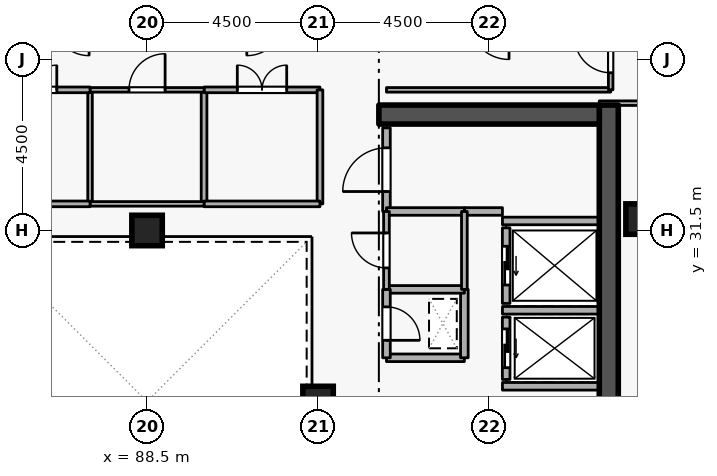
"""IFC4 building model, lengths in metres.
Left out: names, types, materials, properties, quantities, classifications, styles, units other than length and angle.
Written with IfcOpenShell. Run it as: python <this file> out.ifc"""

import sys

from ifc_helpers import new_model, si_unit, direction, frame, frame_2d, origin, origin_2d, place, context, subcontext, project, spatial, rectangle, extrude, element, fill, save


model = new_model("IFC4")
c1 = context("Model", 3, precision=1e-05, world=origin(), true_north=direction((0.0, 1.0)))
c2 = subcontext(c1, "Body", "Model", "MODEL_VIEW")
j1 = project(units=[si_unit("LENGTHUNIT", "METRE"), si_unit("PLANEANGLEUNIT", "RADIAN")], contexts=[c1])
p1 = place(None, origin())
s1 = spatial("IfcSite", under=j1, at=p1, CompositionType="ELEMENT")
p2 = place(p1, origin())
s2 = spatial("IfcBuilding", under=s1, at=p2, CompositionType="ELEMENT")
p3 = place(p2, frame((0.0, 0.0, 276.3)))
s3 = spatial("IfcBuildingStorey", under=s2, at=p3, CompositionType="ELEMENT", Elevation=276.3)
p4 = place(p3, frame((100.65, 19.2, 0.0), z_axis=(0.0, 0.0, 1.0), x_axis=(0.0, 1.0, 0.0)))
e1 = element("IfcWall", 1, at=p4, inside=s3, PredefinedType="SHEAR", context=c2, shape_type="SweptSolid", body=[
    extrude(rectangle(XDim=15.6, YDim=0.5, at=frame_2d((7.8, 0.0))), origin(), (0.0, 0.0, 1.0), 3.6),
])
p5 = place(p3, frame((94.6, 34.55, 0.0), z_axis=(0.0, 0.0, 1.0), x_axis=(1.0, 0.0, 0.0)))
e2 = element("IfcWall", 2, at=p5, inside=s3, PredefinedType="SHEAR", context=c2, shape_type="SweptSolid", body=[
    extrude(rectangle(XDim=5.8, YDim=0.5, at=frame_2d((2.9, 0.0))), origin(), (0.0, 0.0, 1.0), 3.6),
])
for number, where, z_axis, x_axis in (
    (3, (101.5, 31.8, 0.0), (0.0, 0.0, 1.0), (1.0, 0.0, 0.0)),
    (4, (93.0, 27.0, 0.0), (0.0, 0.0, 1.0), (1.0, 0.0, 0.0)),
    (5, (88.5, 31.5, 0.0), (0.0, 0.0, 1.0), (1.0, 0.0, 0.0)),
):
    element("IfcColumn", number, at=place(p3, frame(where, z_axis=z_axis, x_axis=x_axis)), inside=s3, PredefinedType="COLUMN", context=c2, shape_type="SweptSolid", body=[
        extrude(rectangle(XDim=0.8, YDim=0.8, at=origin_2d()), origin(), (0.0, 0.0, 1.0), 3.6),
    ])
p6 = place(p3, frame((97.95, 29.22, 0.0), z_axis=(0.0, 0.0, 1.0), x_axis=(0.0, -1.0, 0.0)))
e6 = element("IfcWall", 6, at=p6, inside=s3, PredefinedType="STANDARD", context=c2, shape_type="SweptSolid", body=[
    extrude(rectangle(XDim=1.64, YDim=0.2, at=frame_2d((0.82, 0.0))), origin(), (0.0, 0.0, 1.0), 3.26),
])
p7 = place(p6, frame((0.31, 0.0, 0.0)))
e7 = element("IfcOpeningElement", 7, at=p7, cuts=e6, PredefinedType="OPENING", context=c2, shape_type="SweptSolid", body=[
    extrude(rectangle(XDim=1.02, YDim=2.06, at=frame_2d((0.51, 1.03))), frame((0.0, 0.11, 0.0), z_axis=(0.0, -1.0, 0.0), x_axis=(1.0, 0.0, 0.0)), (0.0, 0.0, 1.0), 0.22),
])
p8 = place(p3, frame((97.95, 31.57, 0.0), z_axis=(0.0, 0.0, 1.0), x_axis=(0.0, -1.0, 0.0)))
e8 = element("IfcWall", 8, at=p8, inside=s3, PredefinedType="STANDARD", context=c2, shape_type="SweptSolid", body=[
    extrude(rectangle(XDim=1.99, YDim=0.2, at=frame_2d((0.995, 0.0))), origin(), (0.0, 0.0, 1.0), 3.26),
])
p9 = place(p8, frame((0.485, 0.0, 0.0)))
e9 = element("IfcOpeningElement", 9, at=p9, cuts=e8, PredefinedType="OPENING", context=c2, shape_type="SweptSolid", body=[
    extrude(rectangle(XDim=1.02, YDim=2.06, at=frame_2d((0.51, 1.03))), frame((0.0, 0.11, 0.0), z_axis=(0.0, -1.0, 0.0), x_axis=(1.0, 0.0, 0.0)), (0.0, 0.0, 1.0), 0.22),
])
for number, where, z_axis, x_axis in (
    (10, (97.852, 29.4, 0.0), (0.0, 0.0, 1.0), (1.0, 0.0, 0.0)),
    (11, (97.852, 27.4, 0.0), (0.0, 0.0, 1.0), (1.0, 0.0, 0.0)),
    (12, (97.852, 31.75, 0.0), (0.0, 0.0, 1.0), (1.0, 0.0, 0.0)),
):
    element("IfcWall", number, at=place(p3, frame(where, z_axis=z_axis, x_axis=x_axis)), inside=s3, PredefinedType="STANDARD", context=c2, shape_type="SweptSolid", body=[
        extrude(rectangle(XDim=2.536, YDim=0.2, at=frame_2d((1.268, 0.0))), origin(), (0.0, 0.0, 1.0), 3.26),
    ])
p10 = place(p3, frame((94.8, 28.15, 0.0), z_axis=(0.0, 0.0, 1.0), x_axis=(1.0, 0.0, 0.0)))
e13 = element("IfcWall", 13, at=p10, inside=s3, PredefinedType="STANDARD", context=c2, shape_type="SweptSolid", body=[
    extrude(rectangle(XDim=2.05, YDim=0.2, at=frame_2d((1.025, 0.0))), origin(), (0.0, 0.0, 1.0), 3.26),
])
p11 = place(p3, frame((96.85, 28.15, 0.0), z_axis=(0.0, 0.0, 1.0), x_axis=(0.0, 1.0, 0.0)))
e14 = element("IfcWall", 14, at=p11, inside=s3, PredefinedType="STANDARD", context=c2, shape_type="SweptSolid", body=[
    extrude(rectangle(XDim=1.8, YDim=0.2, at=frame_2d((0.9, 0.0))), origin(), (0.0, 0.0, 1.0), 3.26),
])
p12 = place(p3, frame((96.85, 29.95, 0.0), z_axis=(0.0, 0.0, 1.0), x_axis=(-1.0, 0.0, 0.0)))
e15 = element("IfcWall", 15, at=p12, inside=s3, PredefinedType="STANDARD", context=c2, shape_type="SweptSolid", body=[
    extrude(rectangle(XDim=2.05, YDim=0.2, at=frame_2d((1.025, 0.0))), origin(), (0.0, 0.0, 1.0), 3.26),
])
p13 = place(p3, frame((94.8, 29.95, 0.0), z_axis=(0.0, 0.0, 1.0), x_axis=(0.0, -1.0, 0.0)))
e16 = element("IfcWall", 16, at=p13, inside=s3, PredefinedType="STANDARD", context=c2, shape_type="SweptSolid", body=[
    extrude(rectangle(XDim=1.8, YDim=0.2, at=frame_2d((0.9, 0.0))), origin(), (0.0, 0.0, 1.0), 3.26),
])
p14 = place(p13, frame((0.46, 0.0, 0.0)))
e17 = element("IfcOpeningElement", 17, at=p14, cuts=e16, PredefinedType="OPENING", context=c2, shape_type="SweptSolid", body=[
    extrude(rectangle(XDim=0.88, YDim=2.04, at=frame_2d((0.44, 1.02))), frame((0.0, 0.11, 0.0), z_axis=(0.0, -1.0, 0.0), x_axis=(1.0, 0.0, 0.0)), (0.0, 0.0, 1.0), 0.22),
])
p15 = place(p3, frame((94.8, 32.0, 0.0), z_axis=(0.0, 0.0, 1.0), x_axis=(0.0, 1.0, 0.0)))
e18 = element("IfcWall", 18, at=p15, inside=s3, PredefinedType="STANDARD", context=c2, shape_type="SweptSolid", body=[
    extrude(rectangle(XDim=2.2, YDim=0.2, at=frame_2d((1.1, 0.0))), origin(), (0.0, 0.0, 1.0), 3.26),
])
p16 = place(p15, frame((0.525, 0.0, 0.0)))
e19 = element("IfcOpeningElement", 19, at=p16, cuts=e18, PredefinedType="OPENING", context=c2, shape_type="SweptSolid", body=[
    extrude(rectangle(XDim=1.15, YDim=2.1, at=frame_2d((0.575, 1.05))), frame((0.0, 0.11, 0.0), z_axis=(0.0, -1.0, 0.0), x_axis=(1.0, 0.0, 0.0)), (0.0, 0.0, 1.0), 0.22),
])
p17 = place(p3, frame((97.852, 32.0, 0.0), z_axis=(0.0, 0.0, 1.0), x_axis=(-1.0, 0.0, 0.0)))
e20 = element("IfcWall", 20, at=p17, inside=s3, PredefinedType="STANDARD", context=c2, shape_type="SweptSolid", body=[
    extrude(rectangle(XDim=1.002, YDim=0.2, at=frame_2d((0.501, 0.0))), origin(), (0.0, 0.0, 1.0), 3.26),
])
p18 = place(p3, frame((96.85, 32.0, 0.0), z_axis=(0.0, 0.0, 1.0), x_axis=(-1.0, 0.0, 0.0)))
e21 = element("IfcWall", 21, at=p18, inside=s3, PredefinedType="STANDARD", context=c2, shape_type="SweptSolid", body=[
    extrude(rectangle(XDim=2.05, YDim=0.2, at=frame_2d((1.025, 0.0))), origin(), (0.0, 0.0, 1.0), 3.26),
])
p19 = place(p3, frame((94.8, 29.95, 0.0), z_axis=(0.0, 0.0, 1.0), x_axis=(0.0, 1.0, 0.0)))
e22 = element("IfcWall", 22, at=p19, inside=s3, PredefinedType="PARTITIONING", context=c2, shape_type="SweptSolid", body=[
    extrude(rectangle(XDim=2.05, YDim=0.15, at=frame_2d((1.025, 0.0))), origin(), (0.0, 0.0, 1.0), 3.26),
])
p20 = place(p19, frame((0.565, 0.0, 0.0)))
e23 = element("IfcOpeningElement", 23, at=p20, cuts=e22, PredefinedType="OPENING", context=c2, shape_type="SweptSolid", body=[
    extrude(rectangle(XDim=0.92, YDim=2.08, at=frame_2d((0.46, 1.04))), frame((0.0, 0.085, 0.0), z_axis=(0.0, -1.0, 0.0), x_axis=(1.0, 0.0, 0.0)), (0.0, 0.0, 1.0), 0.17),
])
p21 = place(p3, frame((96.85, 32.0, 0.0), z_axis=(0.0, 0.0, 1.0), x_axis=(0.0, -1.0, 0.0)))
e24 = element("IfcWall", 24, at=p21, inside=s3, PredefinedType="PARTITIONING", context=c2, shape_type="SweptSolid", body=[
    extrude(rectangle(XDim=2.05, YDim=0.15, at=frame_2d((1.025, 0.0))), origin(), (0.0, 0.0, 1.0), 3.26),
])
p22 = place(p3, frame((94.8, 35.2, 0.0), z_axis=(0.0, 0.0, 1.0), x_axis=(1.0, 0.0, 0.0)))
e25 = element("IfcWall", 25, at=p22, inside=s3, PredefinedType="PARTITIONING", context=c2, shape_type="SweptSolid", body=[
    extrude(rectangle(XDim=5.9, YDim=0.12, at=frame_2d((2.95, 0.0))), origin(), (0.0, 0.0, 1.0), 3.26),
])
p23 = place(p3, frame((100.7, 35.2, 0.0), z_axis=(0.0, 0.0, 1.0), x_axis=(0.0, 1.0, 0.0)))
e26 = element("IfcWall", 26, at=p23, inside=s3, PredefinedType="PARTITIONING", context=c2, shape_type="SweptSolid", body=[
    extrude(rectangle(XDim=1.85, YDim=0.12, at=frame_2d((0.925, 0.0))), origin(), (0.0, 0.0, 1.0), 3.26),
])
p24 = place(p23, frame((0.45, 0.0, 0.0)))
e27 = element("IfcOpeningElement", 27, at=p24, cuts=e26, PredefinedType="OPENING", context=c2, shape_type="SweptSolid", body=[
    extrude(rectangle(XDim=0.95, YDim=2.1, at=frame_2d((0.475, 1.05))), frame((0.0, 0.07, 0.0), z_axis=(0.0, -1.0, 0.0), x_axis=(1.0, 0.0, 0.0)), (0.0, 0.0, 1.0), 0.14),
])
p25 = place(p3, frame((112.22, 34.85, 0.0), z_axis=(0.0, 0.0, 1.0), x_axis=(-1.0, 0.0, 0.0)))
e28 = element("IfcWall", 28, at=p25, inside=s3, PredefinedType="PARTITIONING", context=c2, shape_type="SweptSolid", body=[
    extrude(rectangle(XDim=11.82, YDim=0.12, at=frame_2d((5.91, 0.0))), origin(), (0.0, 0.0, 1.0), 2.465),
])
p26 = place(p3, frame((90.0, 32.2, 0.0), z_axis=(0.0, 0.0, 1.0), x_axis=(0.0, 1.0, 0.0)))
e29 = element("IfcWall", 29, at=p26, inside=s3, PredefinedType="PARTITIONING", context=c2, shape_type="SweptSolid", body=[
    extrude(rectangle(XDim=3.0, YDim=0.15, at=frame_2d((1.5, 0.0))), origin(), (0.0, 0.0, 1.0), 3.26),
])
p27 = place(p3, frame((90.0, 35.2, 0.0), z_axis=(0.0, 0.0, 1.0), x_axis=(1.0, 0.0, 0.0)))
e30 = element("IfcWall", 30, at=p27, inside=s3, PredefinedType="PARTITIONING", context=c2, shape_type="SweptSolid", body=[
    extrude(rectangle(XDim=3.05, YDim=0.15, at=frame_2d((1.525, 0.0))), origin(), (0.0, 0.0, 1.0), 3.26),
])
p28 = place(p27, frame((0.875, 0.0, 0.0)))
e31 = element("IfcOpeningElement", 31, at=p28, cuts=e30, PredefinedType="OPENING", context=c2, shape_type="SweptSolid", body=[
    extrude(rectangle(XDim=1.3, YDim=2.12, at=frame_2d((0.65, 1.06))), frame((0.0, 0.085, 0.0), z_axis=(0.0, -1.0, 0.0), x_axis=(1.0, 0.0, 0.0)), (0.0, 0.0, 1.0), 0.17),
])
p29 = place(p3, frame((93.05, 35.2, 0.0), z_axis=(0.0, 0.0, 1.0), x_axis=(0.0, -1.0, 0.0)))
e32 = element("IfcWall", 32, at=p29, inside=s3, PredefinedType="PARTITIONING", context=c2, shape_type="SweptSolid", body=[
    extrude(rectangle(XDim=3.0, YDim=0.15, at=frame_2d((1.5, 0.0))), origin(), (0.0, 0.0, 1.0), 3.26),
])
p30 = place(p3, frame((93.05, 32.2, 0.0), z_axis=(0.0, 0.0, 1.0), x_axis=(-1.0, 0.0, 0.0)))
e33 = element("IfcWall", 33, at=p30, inside=s3, PredefinedType="PARTITIONING", context=c2, shape_type="SweptSolid", body=[
    extrude(rectangle(XDim=3.05, YDim=0.15, at=frame_2d((1.525, 0.0))), origin(), (0.0, 0.0, 1.0), 3.26),
])
p31 = place(p3, frame((87.0, 32.2, 0.0), z_axis=(0.0, 0.0, 1.0), x_axis=(0.0, 1.0, 0.0)))
e34 = element("IfcWall", 34, at=p31, inside=s3, PredefinedType="PARTITIONING", context=c2, shape_type="SweptSolid", body=[
    extrude(rectangle(XDim=3.0, YDim=0.12, at=frame_2d((1.5, 0.0))), origin(), (0.0, 0.0, 1.0), 3.26),
])
p32 = place(p3, frame((87.0, 35.2, 0.0), z_axis=(0.0, 0.0, 1.0), x_axis=(1.0, 0.0, 0.0)))
e35 = element("IfcWall", 35, at=p32, inside=s3, PredefinedType="PARTITIONING", context=c2, shape_type="SweptSolid", body=[
    extrude(rectangle(XDim=3.0, YDim=0.12, at=frame_2d((1.5, 0.0))), origin(), (0.0, 0.0, 1.0), 3.26),
])
p33 = place(p32, frame((1.025, 0.0, 0.0)))
e36 = element("IfcOpeningElement", 36, at=p33, cuts=e35, PredefinedType="OPENING", context=c2, shape_type="SweptSolid", body=[
    extrude(rectangle(XDim=0.95, YDim=2.1, at=frame_2d((0.475, 1.05))), frame((0.0, 0.07, 0.0), z_axis=(0.0, -1.0, 0.0), x_axis=(1.0, 0.0, 0.0)), (0.0, 0.0, 1.0), 0.14),
])
p34 = place(p3, frame((90.0, 32.2, 0.0), z_axis=(0.0, 0.0, 1.0), x_axis=(-1.0, 0.0, 0.0)))
e37 = element("IfcWall", 37, at=p34, inside=s3, PredefinedType="PARTITIONING", context=c2, shape_type="SweptSolid", body=[
    extrude(rectangle(XDim=3.0, YDim=0.12, at=frame_2d((1.5, 0.0))), origin(), (0.0, 0.0, 1.0), 3.26),
])
p35 = place(p3, frame((83.95, 35.2, 0.0), z_axis=(0.0, 0.0, 1.0), x_axis=(1.0, 0.0, 0.0)))
e38 = element("IfcWall", 38, at=p35, inside=s3, PredefinedType="PARTITIONING", context=c2, shape_type="SweptSolid", body=[
    extrude(rectangle(XDim=3.05, YDim=0.15, at=frame_2d((1.525, 0.0))), origin(), (0.0, 0.0, 1.0), 3.26),
])
p36 = place(p35, frame((0.875, 0.0, 0.0)))
e39 = element("IfcOpeningElement", 39, at=p36, cuts=e38, PredefinedType="OPENING", context=c2, shape_type="SweptSolid", body=[
    extrude(rectangle(XDim=1.3, YDim=2.12, at=frame_2d((0.65, 1.06))), frame((0.0, 0.085, 0.0), z_axis=(0.0, -1.0, 0.0), x_axis=(1.0, 0.0, 0.0)), (0.0, 0.0, 1.0), 0.17),
])
p37 = place(p3, frame((87.0, 32.2, 0.0), z_axis=(0.0, 0.0, 1.0), x_axis=(-1.0, 0.0, 0.0)))
e40 = element("IfcWall", 40, at=p37, inside=s3, PredefinedType="PARTITIONING", context=c2, shape_type="SweptSolid", body=[
    extrude(rectangle(XDim=3.05, YDim=0.15, at=frame_2d((1.525, 0.0))), origin(), (0.0, 0.0, 1.0), 3.26),
])
p38 = place(p7, origin())
e41 = element("IfcDoor", 41, at=p38, inside=s3, OperationType="SLIDING_TO_LEFT", PredefinedType="DOOR", context=c2, shape_type="SweptSolid", body=[
    extrude(rectangle(XDim=1.02, YDim=2.06, at=frame_2d((0.51, 1.03))), frame((0.0, 0.025, 0.0), z_axis=(0.0, -1.0, 0.0), x_axis=(1.0, 0.0, 0.0)), (0.0, 0.0, 1.0), 0.05),
])
fill(e7, e41)
p39 = place(p9, origin())
e42 = element("IfcDoor", 42, at=p39, inside=s3, OperationType="SLIDING_TO_LEFT", PredefinedType="DOOR", context=c2, shape_type="SweptSolid", body=[
    extrude(rectangle(XDim=1.02, YDim=2.06, at=frame_2d((0.51, 1.03))), frame((0.0, 0.025, 0.0), z_axis=(0.0, -1.0, 0.0), x_axis=(1.0, 0.0, 0.0)), (0.0, 0.0, 1.0), 0.05),
])
fill(e9, e42)
p40 = place(p14, origin())
e43 = element("IfcDoor", 43, at=p40, inside=s3, OperationType="SINGLE_SWING_RIGHT", PredefinedType="DOOR", context=c2, shape_type="SweptSolid", body=[
    extrude(rectangle(XDim=0.88, YDim=2.04, at=frame_2d((0.44, 1.02))), frame((0.0, 0.025, 0.0), z_axis=(0.0, -1.0, 0.0), x_axis=(1.0, 0.0, 0.0)), (0.0, 0.0, 1.0), 0.05),
])
fill(e17, e43)
p41 = place(p20, origin())
e44 = element("IfcDoor", 44, at=p41, inside=s3, OperationType="SINGLE_SWING_RIGHT", PredefinedType="DOOR", context=c2, shape_type="SweptSolid", body=[
    extrude(rectangle(XDim=0.92, YDim=2.08, at=frame_2d((0.46, 1.04))), frame((0.0, 0.025, 0.0), z_axis=(0.0, -1.0, 0.0), x_axis=(1.0, 0.0, 0.0)), (0.0, 0.0, 1.0), 0.05),
])
fill(e23, e44)
p42 = place(p16, origin())
e45 = element("IfcDoor", 45, at=p42, inside=s3, OperationType="SINGLE_SWING_LEFT", PredefinedType="DOOR", context=c2, shape_type="SweptSolid", body=[
    extrude(rectangle(XDim=1.15, YDim=2.1, at=frame_2d((0.575, 1.05))), frame((0.0, 0.025, 0.0), z_axis=(0.0, -1.0, 0.0), x_axis=(1.0, 0.0, 0.0)), (0.0, 0.0, 1.0), 0.05),
])
fill(e19, e45)
p43 = place(p24, origin())
e46 = element("IfcDoor", 46, at=p43, inside=s3, OperationType="SINGLE_SWING_RIGHT", PredefinedType="DOOR", context=c2, shape_type="SweptSolid", body=[
    extrude(rectangle(XDim=0.95, YDim=2.1, at=frame_2d((0.475, 1.05))), frame((0.0, 0.025, 0.0), z_axis=(0.0, -1.0, 0.0), x_axis=(1.0, 0.0, 0.0)), (0.0, 0.0, 1.0), 0.05),
])
fill(e27, e46)
p44 = place(p28, origin())
e47 = element("IfcDoor", 47, at=p44, inside=s3, OperationType="DOUBLE_DOOR_SINGLE_SWING", PredefinedType="DOOR", context=c2, shape_type="SweptSolid", body=[
    extrude(rectangle(XDim=1.3, YDim=2.12, at=frame_2d((0.65, 1.06))), frame((0.0, 0.025, 0.0), z_axis=(0.0, -1.0, 0.0), x_axis=(1.0, 0.0, 0.0)), (0.0, 0.0, 1.0), 0.05),
])
fill(e31, e47)
p45 = place(p33, origin())
e48 = element("IfcDoor", 48, at=p45, inside=s3, OperationType="SINGLE_SWING_RIGHT", PredefinedType="DOOR", context=c2, shape_type="SweptSolid", body=[
    extrude(rectangle(XDim=0.95, YDim=2.1, at=frame_2d((0.475, 1.05))), frame((0.0, 0.025, 0.0), z_axis=(0.0, -1.0, 0.0), x_axis=(1.0, 0.0, 0.0)), (0.0, 0.0, 1.0), 0.05),
])
fill(e36, e48)
p46 = place(p36, origin())
e49 = element("IfcDoor", 49, at=p46, inside=s3, OperationType="DOUBLE_DOOR_SINGLE_SWING", PredefinedType="DOOR", context=c2, shape_type="SweptSolid", body=[
    extrude(rectangle(XDim=1.3, YDim=2.12, at=frame_2d((0.65, 1.06))), frame((0.0, 0.025, 0.0), z_axis=(0.0, -1.0, 0.0), x_axis=(1.0, 0.0, 0.0)), (0.0, 0.0, 1.0), 0.05),
])
fill(e39, e49)
save(model, sys.argv[1])
